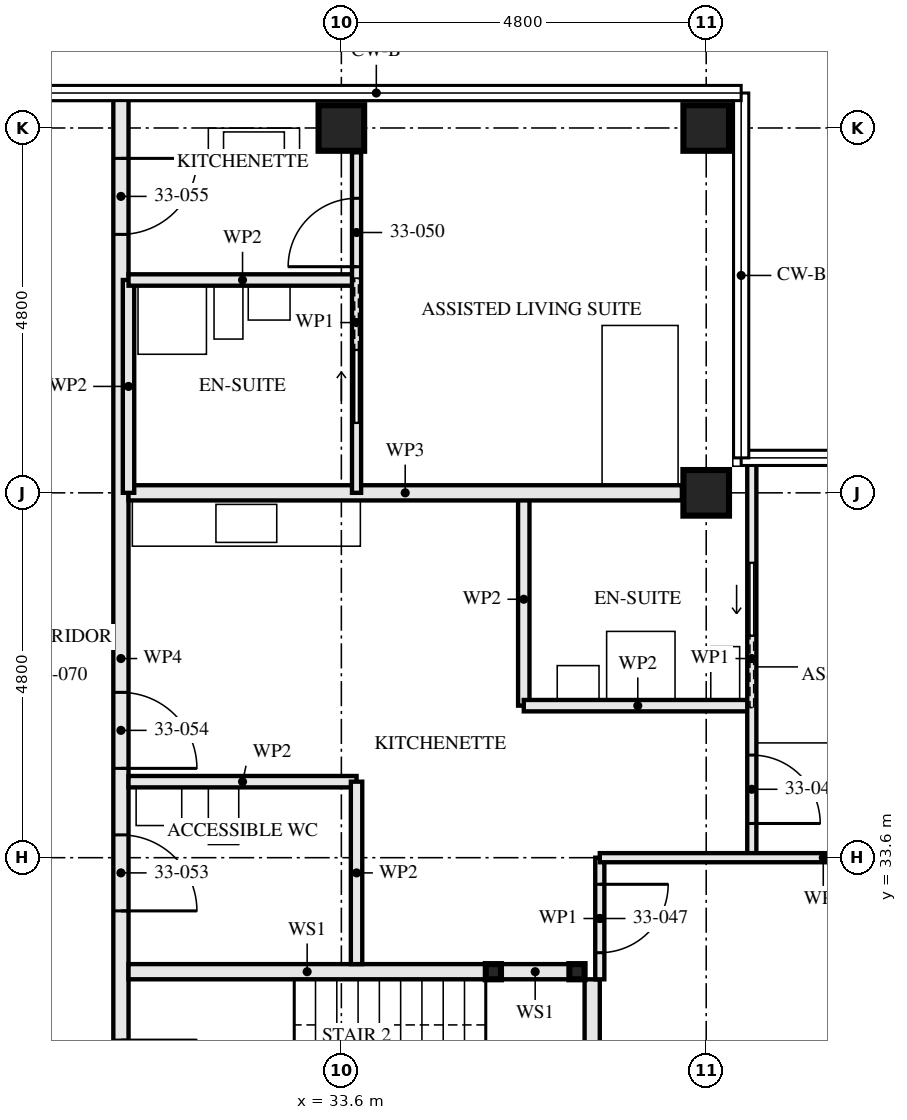
"""IFC4 building model, lengths in metres.
Left out: names, types, materials, properties, quantities, classifications, styles, units other than length and angle.
Written with IfcOpenShell. Run it as: python <this file> out.ifc"""

import sys

from ifc_helpers import new_model, si_unit, direction, frame, frame_2d, origin, origin_2d, place, context, subcontext, project, spatial, rectangle, hollow_rectangle, extrude, element, fill, save


model = new_model("IFC4")
c1 = context("Model", 3, precision=1e-05, world=origin(), true_north=direction((0.0, 1.0)))
c2 = subcontext(c1, "Body", "Model", "MODEL_VIEW")
j1 = project(units=[si_unit("LENGTHUNIT", "METRE"), si_unit("PLANEANGLEUNIT", "RADIAN")], contexts=[c1])
p1 = place(None, origin())
s1 = spatial("IfcSite", under=j1, at=p1, CompositionType="ELEMENT")
p2 = place(p1, origin())
s2 = spatial("IfcBuilding", under=s1, at=p2, CompositionType="ELEMENT")
p3 = place(p2, frame((0.0, 0.0, 122.5)))
s3 = spatial("IfcBuildingStorey", under=s2, at=p3, CompositionType="ELEMENT", Elevation=122.5)
for number, where, z_axis, x_axis in (
    (1, (33.6, 43.2, 0.0), (0.0, 0.0, 1.0), (0.0, 1.0, 0.0)),
    (2, (38.4, 38.4, 0.0), (0.0, 0.0, 1.0), (0.0, 1.0, 0.0)),
    (3, (38.4, 43.2, 0.0), (0.0, 0.0, 1.0), (0.0, 1.0, 0.0)),
):
    element("IfcColumn", number, at=place(p3, frame(where, z_axis=z_axis, x_axis=x_axis)), inside=s3, PredefinedType="COLUMN", context=c2, shape_type="SweptSolid", body=[
        extrude(hollow_rectangle(XDim=0.6, YDim=0.6, WallThickness=0.08, at=origin_2d()), origin(), (0.0, 0.0, 1.0), 3.5),
    ])
for number, where, z_axis, x_axis in (
    (4, (36.7, 32.1, 0.0), (0.0, 0.0, 1.0), (1.0, 0.0, 0.0)),
    (5, (35.6, 32.1, 0.0), (0.0, 0.0, 1.0), (1.0, 0.0, 0.0)),
):
    element("IfcColumn", number, at=place(p3, frame(where, z_axis=z_axis, x_axis=x_axis)), inside=s3, PredefinedType="COLUMN", context=c2, shape_type="SweptSolid", body=[
        extrude(hollow_rectangle(XDim=0.2, YDim=0.2, WallThickness=0.008, at=origin_2d()), origin(), (0.0, 0.0, 1.0), 3.33),
    ])
p4 = place(p3, frame((36.6, 32.1, 0.0), z_axis=(0.0, 0.0, 1.0), x_axis=(-1.0, 0.0, 0.0)))
e6 = element("IfcWall", 6, at=p4, inside=s3, PredefinedType="SOLIDWALL", context=c2, shape_type="SweptSolid", body=[
    extrude(rectangle(XDim=0.9, YDim=0.2, at=frame_2d((0.45, 0.0))), origin(), (0.0, 0.0, 1.0), 2.99),
])
p5 = place(p3, frame((35.5, 32.1, 0.0), z_axis=(0.0, 0.0, 1.0), x_axis=(-1.0, 0.0, 0.0)))
e7 = element("IfcWall", 7, at=p5, inside=s3, PredefinedType="SOLIDWALL", context=c2, shape_type="SweptSolid", body=[
    extrude(rectangle(XDim=4.7, YDim=0.2, at=frame_2d((2.35, 0.0))), origin(), (0.0, 0.0, 1.0), 2.99),
])
p6 = place(p3, frame((36.9, 29.4, 0.0), z_axis=(0.0, 0.0, 1.0), x_axis=(0.0, 1.0, 0.0)))
e8 = element("IfcWall", 8, at=p6, inside=s3, PredefinedType="SOLIDWALL", context=c2, shape_type="SweptSolid", body=[
    extrude(rectangle(XDim=2.6, YDim=0.2, at=frame_2d((1.3, 0.0))), origin(), (0.0, 0.0, 1.0), 3.33),
])
p7 = place(p3, frame((33.8, 32.2, 0.0), z_axis=(0.0, 0.0, 1.0), x_axis=(0.0, 1.0, 0.0)))
e9 = element("IfcWall", 9, at=p7, inside=s3, PredefinedType="PARTITIONING", context=c2, shape_type="SweptSolid", body=[
    extrude(rectangle(XDim=2.4, YDim=0.15, at=frame_2d((1.2, 0.0))), origin(), (0.0, 0.0, 1.0), 2.55),
])
for number, where, z_axis, x_axis in (
    (10, (33.8, 34.6, 0.0), (0.0, 0.0, 1.0), (-1.0, 0.0, 0.0)),
    (11, (39.0, 35.6, 0.0), (0.0, 0.0, 1.0), (-1.0, 0.0, 0.0)),
):
    element("IfcWall", number, at=place(p3, frame(where, z_axis=z_axis, x_axis=x_axis)), inside=s3, PredefinedType="PARTITIONING", context=c2, shape_type="SweptSolid", body=[
        extrude(rectangle(XDim=3.0, YDim=0.15, at=frame_2d((1.5, 0.0))), origin(), (0.0, 0.0, 1.0), 3.33),
    ])
p8 = place(p3, frame((36.0, 35.6, 0.0), z_axis=(0.0, 0.0, 1.0), x_axis=(0.0, 1.0, 0.0)))
e12 = element("IfcWall", 12, at=p8, inside=s3, PredefinedType="PARTITIONING", context=c2, shape_type="SweptSolid", body=[
    extrude(rectangle(XDim=2.8, YDim=0.15, at=frame_2d((1.4, 0.0))), origin(), (0.0, 0.0, 1.0), 3.33),
])
p9 = place(p3, frame((37.0, 32.0, 0.0), z_axis=(0.0, 0.0, 1.0), x_axis=(0.0, 1.0, 0.0)))
e13 = element("IfcWall", 13, at=p9, inside=s3, PredefinedType="PARTITIONING", context=c2, shape_type="SweptSolid", body=[
    extrude(rectangle(XDim=1.6, YDim=0.12, at=frame_2d((0.8, 0.0))), origin(), (0.0, 0.0, 1.0), 3.33),
])
p10 = place(p9, frame((0.35, 0.0, 0.0)))
e14 = element("IfcOpeningElement", 14, at=p10, cuts=e13, PredefinedType="OPENING", context=c2, shape_type="SweptSolid", body=[
    extrude(rectangle(XDim=0.9, YDim=2.1, at=frame_2d((0.45, 1.05))), frame((0.0, 0.071, 0.0), z_axis=(0.0, -1.0, 0.0), x_axis=(1.0, 0.0, 0.0)), (0.0, 0.0, 1.0), 0.141),
])
p11 = place(p3, frame((39.0, 33.6, 0.0), z_axis=(0.0, 0.0, 1.0), x_axis=(0.0, 1.0, 0.0)))
e15 = element("IfcWall", 15, at=p11, inside=s3, PredefinedType="PARTITIONING", context=c2, shape_type="SweptSolid", body=[
    extrude(rectangle(XDim=5.24, YDim=0.12, at=frame_2d((2.62, 0.0))), origin(), (0.0, 0.0, 1.0), 2.32),
])
p12 = place(p11, frame((0.45, 0.0, 0.0)))
e16 = element("IfcOpeningElement", 16, at=p12, cuts=e15, PredefinedType="OPENING", context=c2, shape_type="SweptSolid", body=[
    extrude(rectangle(XDim=0.9, YDim=2.1, at=frame_2d((0.45, 1.05))), frame((0.0, 0.071, 0.0), z_axis=(0.0, -1.0, 0.0), x_axis=(1.0, 0.0, 0.0)), (0.0, 0.0, 1.0), 0.141),
])
p13 = place(p11, frame((2.925, 0.0, 0.0)))
e17 = element("IfcOpeningElement", 17, at=p13, cuts=e15, PredefinedType="OPENING", context=c2, shape_type="SweptSolid", body=[
    extrude(rectangle(XDim=0.95, YDim=2.1, at=frame_2d((0.475, 1.05))), frame((0.0, 0.071, 0.0), z_axis=(0.0, -1.0, 0.0), x_axis=(1.0, 0.0, 0.0)), (0.0, 0.0, 1.0), 0.141),
])
p14 = place(p3, frame((42.88, 33.6, 0.0), z_axis=(0.0, 0.0, 1.0), x_axis=(-1.0, 0.0, 0.0)))
e18 = element("IfcWall", 18, at=p14, inside=s3, PredefinedType="PARTITIONING", context=c2, shape_type="SweptSolid", body=[
    extrude(rectangle(XDim=5.88, YDim=0.12, at=frame_2d((2.94, 0.0))), origin(), (0.0, 0.0, 1.0), 2.55),
])
p15 = place(p3, frame((38.08, 38.4, 0.0), z_axis=(0.0, 0.0, 1.0), x_axis=(-1.0, 0.0, 0.0)))
e19 = element("IfcWall", 19, at=p15, inside=s3, PredefinedType="PARTITIONING", context=c2, shape_type="SweptSolid", body=[
    extrude(rectangle(XDim=7.28, YDim=0.2, at=frame_2d((3.64, 0.0))), origin(), (0.0, 0.0, 1.0), 2.55),
])
p16 = place(p3, frame((33.8, 41.2, 0.0), z_axis=(0.0, 0.0, 1.0), x_axis=(-1.0, 0.0, 0.0)))
e20 = element("IfcWall", 20, at=p16, inside=s3, PredefinedType="PARTITIONING", context=c2, shape_type="SweptSolid", body=[
    extrude(rectangle(XDim=3.0, YDim=0.15, at=frame_2d((1.5, 0.0))), origin(), (0.0, 0.0, 1.0), 3.33),
])
p17 = place(p3, frame((30.8, 38.4, 0.0), z_axis=(0.0, 0.0, 1.0), x_axis=(0.0, 1.0, 0.0)))
e21 = element("IfcWall", 21, at=p17, inside=s3, PredefinedType="PARTITIONING", context=c2, shape_type="SweptSolid", body=[
    extrude(rectangle(XDim=2.8, YDim=0.15, at=frame_2d((1.4, 0.0))), origin(), (0.0, 0.0, 1.0), 3.33),
])
p18 = place(p3, frame((33.8, 38.4, 0.0), z_axis=(0.0, 0.0, 1.0), x_axis=(0.0, 1.0, 0.0)))
e22 = element("IfcWall", 22, at=p18, inside=s3, PredefinedType="PARTITIONING", context=c2, shape_type="SweptSolid", body=[
    extrude(rectangle(XDim=4.48, YDim=0.12, at=frame_2d((2.24, 0.0))), origin(), (0.0, 0.0, 1.0), 3.33),
])
p19 = place(p18, frame((2.975, 0.0, 0.0)))
e23 = element("IfcOpeningElement", 23, at=p19, cuts=e22, PredefinedType="OPENING", context=c2, shape_type="SweptSolid", body=[
    extrude(rectangle(XDim=0.9, YDim=2.1, at=frame_2d((0.45, 1.05))), frame((0.0, 0.071, 0.0), z_axis=(0.0, -1.0, 0.0), x_axis=(1.0, 0.0, 0.0)), (0.0, 0.0, 1.0), 0.141),
])
p20 = place(p18, frame((0.925, 0.0, 0.0)))
e24 = element("IfcOpeningElement", 24, at=p20, cuts=e22, PredefinedType="OPENING", context=c2, shape_type="SweptSolid", body=[
    extrude(rectangle(XDim=0.95, YDim=2.1, at=frame_2d((0.475, 1.05))), frame((0.0, 0.071, 0.0), z_axis=(0.0, -1.0, 0.0), x_axis=(1.0, 0.0, 0.0)), (0.0, 0.0, 1.0), 0.141),
])
p21 = place(p3, frame((30.7, 28.8, 0.0), z_axis=(0.0, 0.0, 1.0), x_axis=(0.0, 1.0, 0.0)))
e25 = element("IfcWall", 25, at=p21, inside=s3, PredefinedType="PARTITIONING", context=c2, shape_type="SweptSolid", body=[
    extrude(rectangle(XDim=14.84, YDim=0.2, at=frame_2d((7.42, 0.0))), origin(), (0.0, 0.0, 1.0), 2.32),
])
p22 = place(p21, frame((1.4, 0.0, 0.0)))
e26 = element("IfcOpeningElement", 26, at=p22, cuts=e25, PredefinedType="OPENING", context=c2, shape_type="SweptSolid", body=[
    extrude(rectangle(XDim=1.0, YDim=2.1, at=frame_2d((0.5, 1.05))), frame((0.0, 0.111, 0.0), z_axis=(0.0, -1.0, 0.0), x_axis=(1.0, 0.0, 0.0)), (0.0, 0.0, 1.0), 0.221),
])
p23 = place(p21, frame((4.1, 0.0, 0.0)))
e27 = element("IfcOpeningElement", 27, at=p23, cuts=e25, PredefinedType="OPENING", context=c2, shape_type="SweptSolid", body=[
    extrude(rectangle(XDim=1.0, YDim=2.1, at=frame_2d((0.5, 1.05))), frame((0.0, 0.111, 0.0), z_axis=(0.0, -1.0, 0.0), x_axis=(1.0, 0.0, 0.0)), (0.0, 0.0, 1.0), 0.221),
])
p24 = place(p21, frame((5.975, 0.0, 0.0)))
e28 = element("IfcOpeningElement", 28, at=p24, cuts=e25, PredefinedType="OPENING", context=c2, shape_type="SweptSolid", body=[
    extrude(rectangle(XDim=1.0, YDim=2.1, at=frame_2d((0.5, 1.05))), frame((0.0, 0.111, 0.0), z_axis=(0.0, -1.0, 0.0), x_axis=(1.0, 0.0, 0.0)), (0.0, 0.0, 1.0), 0.221),
])
p25 = place(p21, frame((13.0, 0.0, 0.0)))
e29 = element("IfcOpeningElement", 29, at=p25, cuts=e25, PredefinedType="OPENING", context=c2, shape_type="SweptSolid", body=[
    extrude(rectangle(XDim=1.0, YDim=2.1, at=frame_2d((0.5, 1.05))), frame((0.0, 0.111, 0.0), z_axis=(0.0, -1.0, 0.0), x_axis=(1.0, 0.0, 0.0)), (0.0, 0.0, 1.0), 0.221),
])
p26 = place(p10, frame((0.9, 0.0, 0.0), z_axis=(0.0, 0.0, 1.0), x_axis=(-1.0, 0.0, 0.0)))
e30 = element("IfcDoor", 30, at=p26, inside=s3, OperationType="SINGLE_SWING_RIGHT", PredefinedType="DOOR", context=c2, shape_type="SweptSolid", body=[
    extrude(rectangle(XDim=0.9, YDim=2.1, at=frame_2d((0.45, 1.05))), frame((0.0, 0.022, 0.0), z_axis=(0.0, -1.0, 0.0), x_axis=(1.0, 0.0, 0.0)), (0.0, 0.0, 1.0), 0.044),
])
fill(e14, e30)
p27 = place(p12, frame((0.9, 0.0, 0.0), z_axis=(0.0, 0.0, 1.0), x_axis=(-1.0, 0.0, 0.0)))
e31 = element("IfcDoor", 31, at=p27, inside=s3, OperationType="SINGLE_SWING_LEFT", PredefinedType="DOOR", context=c2, shape_type="SweptSolid", body=[
    extrude(rectangle(XDim=0.9, YDim=2.1, at=frame_2d((0.45, 1.05))), frame((0.0, 0.022, 0.0), z_axis=(0.0, -1.0, 0.0), x_axis=(1.0, 0.0, 0.0)), (0.0, 0.0, 1.0), 0.044),
])
fill(e16, e31)
p28 = place(p13, origin())
e32 = element("IfcDoor", 32, at=p28, inside=s3, OperationType="SLIDING_TO_RIGHT", PredefinedType="DOOR", context=c2, shape_type="SweptSolid", body=[
    extrude(rectangle(XDim=0.95, YDim=2.1, at=frame_2d((0.475, 1.05))), frame((0.0, 0.022, 0.0), z_axis=(0.0, -1.0, 0.0), x_axis=(1.0, 0.0, 0.0)), (0.0, 0.0, 1.0), 0.044),
])
fill(e17, e32)
p29 = place(p19, origin())
e33 = element("IfcDoor", 33, at=p29, inside=s3, OperationType="SINGLE_SWING_RIGHT", PredefinedType="DOOR", context=c2, shape_type="SweptSolid", body=[
    extrude(rectangle(XDim=0.9, YDim=2.1, at=frame_2d((0.45, 1.05))), frame((0.0, 0.022, 0.0), z_axis=(0.0, -1.0, 0.0), x_axis=(1.0, 0.0, 0.0)), (0.0, 0.0, 1.0), 0.044),
])
fill(e23, e33)
p30 = place(p20, origin())
e34 = element("IfcDoor", 34, at=p30, inside=s3, OperationType="SLIDING_TO_LEFT", PredefinedType="DOOR", context=c2, shape_type="SweptSolid", body=[
    extrude(rectangle(XDim=0.95, YDim=2.1, at=frame_2d((0.475, 1.05))), frame((0.0, 0.022, 0.0), z_axis=(0.0, -1.0, 0.0), x_axis=(1.0, 0.0, 0.0)), (0.0, 0.0, 1.0), 0.044),
])
fill(e24, e34)
p31 = place(p23, frame((1.0, 0.0, 0.0), z_axis=(0.0, 0.0, 1.0), x_axis=(-1.0, 0.0, 0.0)))
e35 = element("IfcDoor", 35, at=p31, inside=s3, OperationType="SINGLE_SWING_LEFT", PredefinedType="DOOR", context=c2, shape_type="SweptSolid", body=[
    extrude(rectangle(XDim=1.0, YDim=2.1, at=frame_2d((0.5, 1.05))), frame((0.0, 0.027, 0.0), z_axis=(0.0, -1.0, 0.0), x_axis=(1.0, 0.0, 0.0)), (0.0, 0.0, 1.0), 0.054),
])
fill(e27, e35)
p32 = place(p24, frame((1.0, 0.0, 0.0), z_axis=(0.0, 0.0, 1.0), x_axis=(-1.0, 0.0, 0.0)))
e36 = element("IfcDoor", 36, at=p32, inside=s3, OperationType="SINGLE_SWING_LEFT", PredefinedType="DOOR", context=c2, shape_type="SweptSolid", body=[
    extrude(rectangle(XDim=1.0, YDim=2.1, at=frame_2d((0.5, 1.05))), frame((0.0, 0.027, 0.0), z_axis=(0.0, -1.0, 0.0), x_axis=(1.0, 0.0, 0.0)), (0.0, 0.0, 1.0), 0.054),
])
fill(e28, e36)
p33 = place(p25, frame((1.0, 0.0, 0.0), z_axis=(0.0, 0.0, 1.0), x_axis=(-1.0, 0.0, 0.0)))
e37 = element("IfcDoor", 37, at=p33, inside=s3, OperationType="SINGLE_SWING_RIGHT", PredefinedType="DOOR", context=c2, shape_type="SweptSolid", body=[
    extrude(rectangle(XDim=1.0, YDim=2.1, at=frame_2d((0.5, 1.05))), frame((0.0, 0.027, 0.0), z_axis=(0.0, -1.0, 0.0), x_axis=(1.0, 0.0, 0.0)), (0.0, 0.0, 1.0), 0.054),
])
fill(e29, e37)
save(model, sys.argv[1])
